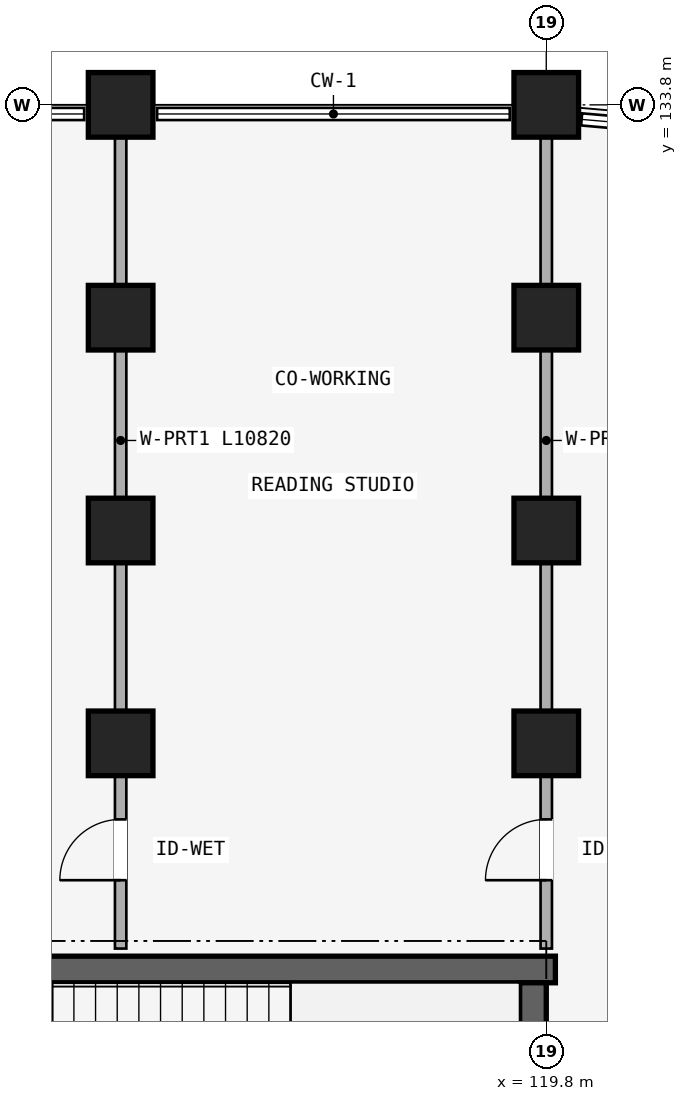
"""IFC4 building model, lengths in metres.
Left out: names, types, materials, properties, quantities, classifications, styles, units other than length and angle.
Written with IfcOpenShell. Run it as: python <this file> out.ifc"""

import sys

from ifc_helpers import new_model, si_unit, direction, frame, frame_2d, origin, origin_2d, place, context, subcontext, project, spatial, rectangle, extrude, element, fill, save


model = new_model("IFC4")
c1 = context("Model", 3, precision=1e-05, world=origin(), true_north=direction((0.0, 1.0)))
c2 = subcontext(c1, "Body", "Model", "MODEL_VIEW")
j1 = project(units=[si_unit("LENGTHUNIT", "METRE"), si_unit("PLANEANGLEUNIT", "RADIAN")], contexts=[c1])
p1 = place(None, origin())
s1 = spatial("IfcSite", under=j1, at=p1, CompositionType="ELEMENT")
p2 = place(p1, origin())
s2 = spatial("IfcBuilding", under=s1, at=p2, CompositionType="ELEMENT")
p3 = place(p2, frame((0.0, 0.0, 4.5)))
s3 = spatial("IfcBuildingStorey", under=s2, at=p3, CompositionType="ELEMENT", Elevation=4.5)
p4 = place(p3, frame((119.92, 122.425, 0.0), z_axis=(0.0, 0.0, 1.0), x_axis=(-1.0, 0.0, 0.0)))
e1 = element("IfcWall", 1, at=p4, inside=s3, PredefinedType="SHEAR", context=c2, shape_type="SweptSolid", body=[
    extrude(rectangle(XDim=8.545, YDim=0.35, at=frame_2d((4.272, 0.0))), origin(), (0.0, 0.0, 1.0), 3.98),
])
p5 = place(p3, frame((119.625, 118.65, 0.0), z_axis=(0.0, 0.0, 1.0), x_axis=(0.0, 1.0, 0.0)))
e2 = element("IfcWall", 2, at=p5, inside=s3, PredefinedType="SHEAR", context=c2, shape_type="SweptSolid", body=[
    extrude(rectangle(XDim=3.6, YDim=0.35, at=frame_2d((1.8, 0.0))), origin(), (0.0, 0.0, 1.0), 3.98),
])
for number, where, z_axis, x_axis in (
    (3, (119.8, 125.4, 0.0), (0.0, 0.0, 1.0), (1.0, 0.0, 0.0)),
    (4, (119.8, 128.2, 0.0), (0.0, 0.0, 1.0), (1.0, 0.0, 0.0)),
    (5, (119.8, 131.0, 0.0), (0.0, 0.0, 1.0), (1.0, 0.0, 0.0)),
    (6, (119.8, 133.8, 0.0), (0.0, 0.0, 1.0), (1.0, 0.0, 0.0)),
    (7, (114.2, 125.4, 0.0), (0.0, 0.0, 1.0), (1.0, 0.0, 0.0)),
    (8, (114.2, 128.2, 0.0), (0.0, 0.0, 1.0), (1.0, 0.0, 0.0)),
    (9, (114.2, 131.0, 0.0), (0.0, 0.0, 1.0), (1.0, 0.0, 0.0)),
    (10, (114.2, 133.8, 0.0), (0.0, 0.0, 1.0), (1.0, 0.0, 0.0)),
):
    element("IfcColumn", number, at=place(p3, frame(where, z_axis=z_axis, x_axis=x_axis)), inside=s3, PredefinedType="COLUMN", context=c2, shape_type="SweptSolid", body=[
        extrude(rectangle(XDim=0.85, YDim=0.85, at=origin_2d()), origin(), (0.0, 0.0, 1.0), 3.98),
    ])
p6 = place(p3, frame((114.2, 122.7, 0.0), z_axis=(0.0, 0.0, 1.0), x_axis=(0.0, 1.0, 0.0)))
e11 = element("IfcWall", 11, at=p6, inside=s3, PredefinedType="PARTITIONING", context=c2, shape_type="SweptSolid", body=[
    extrude(rectangle(XDim=10.82, YDim=0.15, at=frame_2d((5.41, 0.0))), origin(), (0.0, 0.0, 1.0), 3.322),
])
p7 = place(p6, frame((0.899, 0.0, 0.0)))
e12 = element("IfcOpeningElement", 12, at=p7, cuts=e11, PredefinedType="OPENING", context=c2, shape_type="SweptSolid", body=[
    extrude(rectangle(XDim=0.8, YDim=2.1, at=frame_2d((0.4, 1.05))), frame((0.0, 0.085, 0.0), z_axis=(0.0, -1.0, 0.0), x_axis=(1.0, 0.0, 0.0)), (0.0, 0.0, 1.0), 0.17),
])
p8 = place(p3, frame((119.8, 122.7, 0.0), z_axis=(0.0, 0.0, 1.0), x_axis=(0.0, 1.0, 0.0)))
e13 = element("IfcWall", 13, at=p8, inside=s3, PredefinedType="PARTITIONING", context=c2, shape_type="SweptSolid", body=[
    extrude(rectangle(XDim=10.82, YDim=0.15, at=frame_2d((5.41, 0.0))), origin(), (0.0, 0.0, 1.0), 3.322),
])
p9 = place(p8, frame((0.899, 0.0, 0.0)))
e14 = element("IfcOpeningElement", 14, at=p9, cuts=e13, PredefinedType="OPENING", context=c2, shape_type="SweptSolid", body=[
    extrude(rectangle(XDim=0.8, YDim=2.1, at=frame_2d((0.4, 1.05))), frame((0.0, 0.085, 0.0), z_axis=(0.0, -1.0, 0.0), x_axis=(1.0, 0.0, 0.0)), (0.0, 0.0, 1.0), 0.17),
])
p10 = place(p7, origin())
e15 = element("IfcDoor", 15, at=p10, inside=s3, OperationType="SINGLE_SWING_LEFT", PredefinedType="DOOR", context=c2, shape_type="SweptSolid", body=[
    extrude(rectangle(XDim=0.8, YDim=2.1, at=frame_2d((0.4, 1.05))), frame((0.0, 0.025, 0.0), z_axis=(0.0, -1.0, 0.0), x_axis=(1.0, 0.0, 0.0)), (0.0, 0.0, 1.0), 0.05),
])
fill(e12, e15)
p11 = place(p9, origin())
e16 = element("IfcDoor", 16, at=p11, inside=s3, OperationType="SINGLE_SWING_LEFT", PredefinedType="DOOR", context=c2, shape_type="SweptSolid", body=[
    extrude(rectangle(XDim=0.8, YDim=2.1, at=frame_2d((0.4, 1.05))), frame((0.0, 0.025, 0.0), z_axis=(0.0, -1.0, 0.0), x_axis=(1.0, 0.0, 0.0)), (0.0, 0.0, 1.0), 0.05),
])
fill(e14, e16)
save(model, sys.argv[1])
